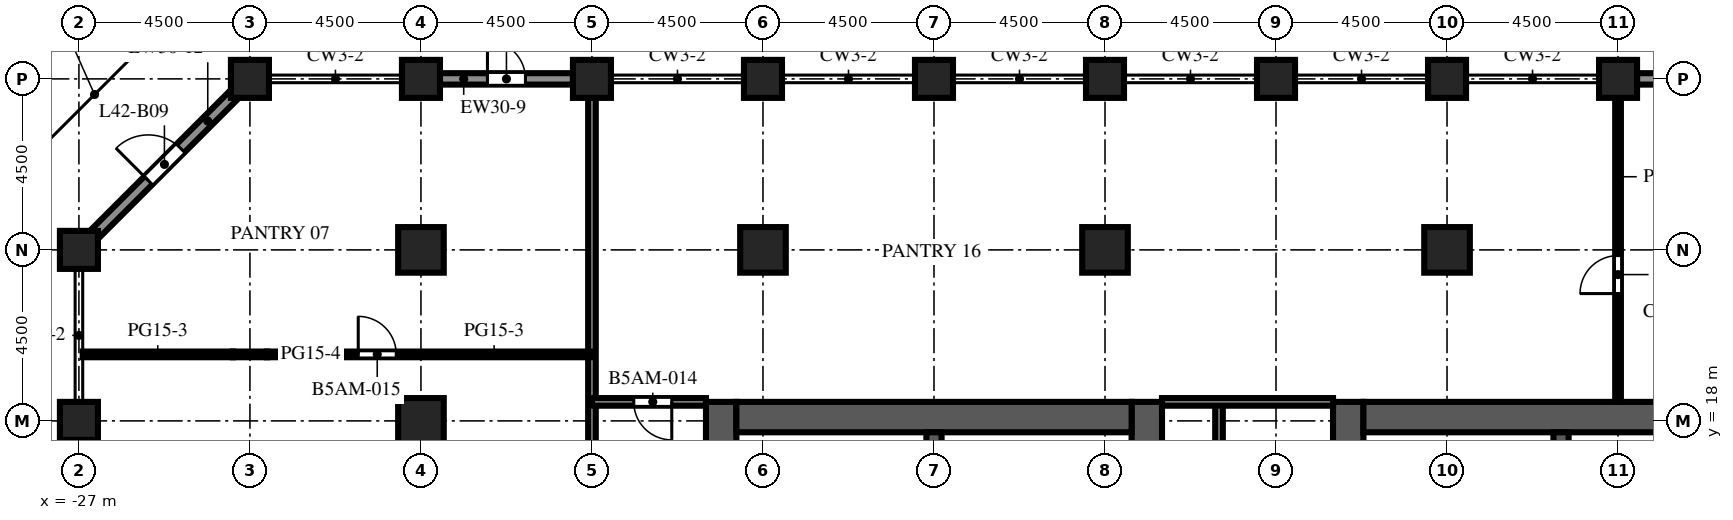
"""IFC4 building model, lengths in metres.
Left out: names, types, materials, properties, quantities, classifications, styles, units other than length and angle.
Written with IfcOpenShell. Run it as: python <this file> out.ifc"""

import sys

from ifc_helpers import new_model, si_unit, direction, frame, frame_2d, origin, origin_2d, place, context, subcontext, project, spatial, rectangle, extrude, element, fill, save


model = new_model("IFC4")
c1 = context("Model", 3, precision=1e-05, world=origin(), true_north=direction((0.0, 1.0)))
c2 = subcontext(c1, "Body", "Model", "MODEL_VIEW")
j1 = project(units=[si_unit("LENGTHUNIT", "METRE"), si_unit("PLANEANGLEUNIT", "RADIAN")], contexts=[c1])
p1 = place(None, origin())
s1 = spatial("IfcSite", under=j1, at=p1, CompositionType="ELEMENT")
p2 = place(p1, origin())
s2 = spatial("IfcBuilding", under=s1, at=p2, CompositionType="ELEMENT")
p3 = place(p2, frame((0.0, 0.0, 185.5)))
s3 = spatial("IfcBuildingStorey", under=s2, at=p3, CompositionType="ELEMENT", Elevation=185.5)
p4 = place(p3, frame((-27.0, 18.0, 0.0), z_axis=(0.0, 0.0, 1.0), x_axis=(1.0, 0.0, 0.0)))
e1 = element("IfcColumn", 1, at=p4, inside=s3, PredefinedType="COLUMN", context=c2, shape_type="SweptSolid", body=[
    extrude(rectangle(XDim=1.0, YDim=1.0, at=origin_2d()), origin(), (0.0, 0.0, 1.0), 3.75),
])
p5 = place(p3, frame((-27.0, 22.5, 0.0), z_axis=(0.0, 0.0, 1.0), x_axis=(1.0, 0.0, 0.0)))
e2 = element("IfcColumn", 2, at=p5, inside=s3, PredefinedType="COLUMN", context=c2, shape_type="SweptSolid", body=[
    extrude(rectangle(XDim=1.0, YDim=1.0, at=origin_2d()), origin(), (0.0, 0.0, 1.0), 6.0),
])
p6 = place(p3, frame((-22.5, 27.0, 0.0), z_axis=(0.0, 0.0, 1.0), x_axis=(1.0, 0.0, 0.0)))
e3 = element("IfcColumn", 3, at=p6, inside=s3, PredefinedType="COLUMN", context=c2, shape_type="SweptSolid", body=[
    extrude(rectangle(XDim=1.0, YDim=1.0, at=origin_2d()), origin(), (0.0, 0.0, 1.0), 3.75),
])
for number, where, z_axis, x_axis in (
    (4, (-18.0, 27.0, 0.0), (0.0, 0.0, 1.0), (1.0, 0.0, 0.0)),
    (5, (-13.5, 27.0, 0.0), (0.0, 0.0, 1.0), (1.0, 0.0, 0.0)),
    (6, (-9.0, 27.0, 0.0), (0.0, 0.0, 1.0), (1.0, 0.0, 0.0)),
    (7, (-4.5, 27.0, 0.0), (0.0, 0.0, 1.0), (1.0, 0.0, 0.0)),
    (8, (0.0, 27.0, 0.0), (0.0, 0.0, 1.0), (1.0, 0.0, 0.0)),
    (9, (4.5, 27.0, 0.0), (0.0, 0.0, 1.0), (1.0, 0.0, 0.0)),
    (10, (9.0, 27.0, 0.0), (0.0, 0.0, 1.0), (1.0, 0.0, 0.0)),
    (11, (13.5, 27.0, 0.0), (0.0, 0.0, 1.0), (1.0, 0.0, 0.0)),
):
    element("IfcColumn", number, at=place(p3, frame(where, z_axis=z_axis, x_axis=x_axis)), inside=s3, PredefinedType="COLUMN", context=c2, shape_type="SweptSolid", body=[
        extrude(rectangle(XDim=1.0, YDim=1.0, at=origin_2d()), origin(), (0.0, 0.0, 1.0), 6.0),
    ])
p7 = place(p3, frame((-18.0, 18.0, 0.0), z_axis=(0.0, 0.0, 1.0), x_axis=(1.0, 0.0, 0.0)))
e12 = element("IfcColumn", 12, at=p7, inside=s3, PredefinedType="COLUMN", context=c2, shape_type="SweptSolid", body=[
    extrude(rectangle(XDim=1.2, YDim=1.2, at=origin_2d()), origin(), (0.0, 0.0, 1.0), 5.55),
])
for number, where, z_axis, x_axis in (
    (13, (-18.0, 22.5, 0.0), (0.0, 0.0, 1.0), (1.0, 0.0, 0.0)),
    (14, (-9.0, 22.5, 0.0), (0.0, 0.0, 1.0), (1.0, 0.0, 0.0)),
    (15, (0.0, 22.5, 0.0), (0.0, 0.0, 1.0), (1.0, 0.0, 0.0)),
    (16, (9.0, 22.5, 0.0), (0.0, 0.0, 1.0), (1.0, 0.0, 0.0)),
):
    element("IfcColumn", number, at=place(p3, frame(where, z_axis=z_axis, x_axis=x_axis)), inside=s3, PredefinedType="COLUMN", context=c2, shape_type="SweptSolid", body=[
        extrude(rectangle(XDim=1.2, YDim=1.2, at=origin_2d()), origin(), (0.0, 0.0, 1.0), 6.0),
    ])
p8 = place(p3, frame((-10.1, -9.0, 0.0), z_axis=(0.0, 0.0, 1.0), x_axis=(0.0, 1.0, 0.0)))
e17 = element("IfcWall", 17, at=p8, inside=s3, PredefinedType="SHEAR", context=c2, shape_type="SweptSolid", body=[
    extrude(rectangle(XDim=27.5, YDim=0.8, at=frame_2d((13.75, 0.0))), origin(), (0.0, 0.0, 1.0), 6.0),
])
p9 = place(p8, frame((12.55, 0.0, 0.0)))
e18 = element("IfcOpeningElement", 18, at=p9, cuts=e17, PredefinedType="OPENING", context=c2, shape_type="SweptSolid", body=[
    extrude(rectangle(XDim=2.4, YDim=2.4, at=frame_2d((1.2, 1.2))), frame((0.0, 0.41, 0.0), z_axis=(0.0, -1.0, 0.0), x_axis=(1.0, 0.0, 0.0)), (0.0, 0.0, 1.0), 0.82),
])
p10 = place(p8, frame((6.825, 0.0, 0.0)))
e19 = element("IfcOpeningElement", 19, at=p10, cuts=e17, PredefinedType="OPENING", context=c2, shape_type="SweptSolid", body=[
    extrude(rectangle(XDim=1.2, YDim=2.1, at=frame_2d((0.6, 1.05))), frame((0.0, 0.41, 0.0), z_axis=(0.0, -1.0, 0.0), x_axis=(1.0, 0.0, 0.0)), (0.0, 0.0, 1.0), 0.82),
])
p11 = place(p8, frame((19.475, 0.0, 0.0)))
e20 = element("IfcOpeningElement", 20, at=p11, cuts=e17, PredefinedType="OPENING", context=c2, shape_type="SweptSolid", body=[
    extrude(rectangle(XDim=1.2, YDim=2.1, at=frame_2d((0.6, 1.05))), frame((0.0, 0.41, 0.0), z_axis=(0.0, -1.0, 0.0), x_axis=(1.0, 0.0, 0.0)), (0.0, 0.0, 1.0), 0.82),
])
p12 = place(p3, frame((1.1, -9.0, 0.0), z_axis=(0.0, 0.0, 1.0), x_axis=(0.0, 1.0, 0.0)))
e21 = element("IfcWall", 21, at=p12, inside=s3, PredefinedType="SHEAR", context=c2, shape_type="SweptSolid", body=[
    extrude(rectangle(XDim=27.5, YDim=0.8, at=frame_2d((13.75, 0.0))), origin(), (0.0, 0.0, 1.0), 6.0),
])
p13 = place(p12, frame((12.55, 0.0, 0.0)))
e22 = element("IfcOpeningElement", 22, at=p13, cuts=e21, PredefinedType="OPENING", context=c2, shape_type="SweptSolid", body=[
    extrude(rectangle(XDim=2.4, YDim=2.4, at=frame_2d((1.2, 1.2))), frame((0.0, 0.41, 0.0), z_axis=(0.0, -1.0, 0.0), x_axis=(1.0, 0.0, 0.0)), (0.0, 0.0, 1.0), 0.82),
])
p14 = place(p12, frame((3.85, 0.0, 0.0)))
e23 = element("IfcOpeningElement", 23, at=p14, cuts=e21, PredefinedType="OPENING", context=c2, shape_type="SweptSolid", body=[
    extrude(rectangle(XDim=0.95, YDim=2.1, at=frame_2d((0.475, 1.05))), frame((0.0, 0.41, 0.0), z_axis=(0.0, -1.0, 0.0), x_axis=(1.0, 0.0, 0.0)), (0.0, 0.0, 1.0), 0.82),
])
p15 = place(p12, frame((23.475, 0.0, 0.0)))
e24 = element("IfcOpeningElement", 24, at=p15, cuts=e21, PredefinedType="OPENING", context=c2, shape_type="SweptSolid", body=[
    extrude(rectangle(XDim=1.2, YDim=2.1, at=frame_2d((0.6, 1.05))), frame((0.0, 0.41, 0.0), z_axis=(0.0, -1.0, 0.0), x_axis=(1.0, 0.0, 0.0)), (0.0, 0.0, 1.0), 0.82),
])
p16 = place(p3, frame((-9.7, 18.1, 0.0), z_axis=(0.0, 0.0, 1.0), x_axis=(1.0, 0.0, 0.0)))
e25 = element("IfcWall", 25, at=p16, inside=s3, PredefinedType="SHEAR", context=c2, shape_type="SweptSolid", body=[
    extrude(rectangle(XDim=10.4, YDim=0.8, at=frame_2d((5.2, 0.0))), origin(), (0.0, 0.0, 1.0), 6.0),
])
p17 = place(p3, frame((-4.5, 10.2, 0.0), z_axis=(0.0, 0.0, 1.0), x_axis=(0.0, 1.0, 0.0)))
e26 = element("IfcWall", 26, at=p17, inside=s3, PredefinedType="SHEAR", context=c2, shape_type="SweptSolid", body=[
    extrude(rectangle(XDim=7.5, YDim=0.4, at=frame_2d((3.75, 0.0))), origin(), (0.0, 0.0, 1.0), 6.0),
])
p18 = place(p3, frame((6.4, -9.0, 0.0), z_axis=(0.0, 0.0, 1.0), x_axis=(0.0, 1.0, 0.0)))
e27 = element("IfcWall", 27, at=p18, inside=s3, PredefinedType="SHEAR", context=c2, shape_type="SweptSolid", body=[
    extrude(rectangle(XDim=27.5, YDim=0.8, at=frame_2d((13.75, 0.0))), origin(), (0.0, 0.0, 1.0), 6.0),
])
p19 = place(p18, frame((12.55, 0.0, 0.0)))
e28 = element("IfcOpeningElement", 28, at=p19, cuts=e27, PredefinedType="OPENING", context=c2, shape_type="SweptSolid", body=[
    extrude(rectangle(XDim=2.4, YDim=2.4, at=frame_2d((1.2, 1.2))), frame((0.0, 0.41, 0.0), z_axis=(0.0, -1.0, 0.0), x_axis=(1.0, 0.0, 0.0)), (0.0, 0.0, 1.0), 0.82),
])
p20 = place(p18, frame((3.85, 0.0, 0.0)))
e29 = element("IfcOpeningElement", 29, at=p20, cuts=e27, PredefinedType="OPENING", context=c2, shape_type="SweptSolid", body=[
    extrude(rectangle(XDim=0.95, YDim=2.1, at=frame_2d((0.475, 1.05))), frame((0.0, 0.41, 0.0), z_axis=(0.0, -1.0, 0.0), x_axis=(1.0, 0.0, 0.0)), (0.0, 0.0, 1.0), 0.82),
])
p21 = place(p18, frame((23.475, 0.0, 0.0)))
e30 = element("IfcOpeningElement", 30, at=p21, cuts=e27, PredefinedType="OPENING", context=c2, shape_type="SweptSolid", body=[
    extrude(rectangle(XDim=1.2, YDim=2.1, at=frame_2d((0.6, 1.05))), frame((0.0, 0.41, 0.0), z_axis=(0.0, -1.0, 0.0), x_axis=(1.0, 0.0, 0.0)), (0.0, 0.0, 1.0), 0.82),
])
p22 = place(p3, frame((6.8, 18.1, 0.0), z_axis=(0.0, 0.0, 1.0), x_axis=(1.0, 0.0, 0.0)))
e31 = element("IfcWall", 31, at=p22, inside=s3, PredefinedType="SHEAR", context=c2, shape_type="SweptSolid", body=[
    extrude(rectangle(XDim=10.4, YDim=0.8, at=frame_2d((5.2, 0.0))), origin(), (0.0, 0.0, 1.0), 6.0),
])
p23 = place(p3, frame((12.0, 10.2, 0.0), z_axis=(0.0, 0.0, 1.0), x_axis=(0.0, 1.0, 0.0)))
e32 = element("IfcWall", 32, at=p23, inside=s3, PredefinedType="SHEAR", context=c2, shape_type="SweptSolid", body=[
    extrude(rectangle(XDim=7.5, YDim=0.4, at=frame_2d((3.75, 0.0))), origin(), (0.0, 0.0, 1.0), 6.0),
])
p24 = place(p3, frame((14.0, 27.0, 0.0), z_axis=(0.0, 0.0, 1.0), x_axis=(1.0, 0.0, 0.0)))
e33 = element("IfcWall", 33, at=p24, inside=s3, PredefinedType="SOLIDWALL", context=c2, shape_type="SweptSolid", body=[
    extrude(rectangle(XDim=3.5, YDim=0.3, at=frame_2d((1.75, 0.0))), origin(), (0.0, 0.0, 1.0), 4.75),
])
p25 = place(p24, frame((1.25, 0.0, 0.0)))
e34 = element("IfcOpeningElement", 34, at=p25, cuts=e33, PredefinedType="OPENING", context=c2, shape_type="SweptSolid", body=[
    extrude(rectangle(XDim=1.0, YDim=2.2, at=frame_2d((0.5, 1.1))), frame((0.0, 0.16, 0.0), z_axis=(0.0, -1.0, 0.0), x_axis=(1.0, 0.0, 0.0)), (0.0, 0.0, 1.0), 0.32),
])
p26 = place(p3, frame((-17.5, 27.0, 0.0), z_axis=(0.0, 0.0, 1.0), x_axis=(1.0, 0.0, 0.0)))
e35 = element("IfcWall", 35, at=p26, inside=s3, PredefinedType="SOLIDWALL", context=c2, shape_type="SweptSolid", body=[
    extrude(rectangle(XDim=3.5, YDim=0.3, at=frame_2d((1.75, 0.0))), origin(), (0.0, 0.0, 1.0), 4.75),
])
p27 = place(p26, frame((1.25, 0.0, 0.0)))
e36 = element("IfcOpeningElement", 36, at=p27, cuts=e35, PredefinedType="OPENING", context=c2, shape_type="SweptSolid", body=[
    extrude(rectangle(XDim=1.0, YDim=2.2, at=frame_2d((0.5, 1.1))), frame((0.0, 0.16, 0.0), z_axis=(0.0, -1.0, 0.0), x_axis=(1.0, 0.0, 0.0)), (0.0, 0.0, 1.0), 0.32),
])
p28 = place(p3, frame((-26.606, 22.894, 0.0), z_axis=(0.0, 0.0, 1.0), x_axis=(0.707106781187, 0.707106781187, 0.0)))
e37 = element("IfcWall", 37, at=p28, inside=s3, PredefinedType="SOLIDWALL", context=c2, shape_type="SweptSolid", body=[
    extrude(rectangle(XDim=5.25, YDim=0.3, at=frame_2d((2.625, 0.0))), origin(), (0.0, 0.0, 1.0), 3.75),
])
p29 = place(p28, frame((2.025, 0.0, 0.0)))
e38 = element("IfcOpeningElement", 38, at=p29, cuts=e37, PredefinedType="OPENING", context=c2, shape_type="SweptSolid", body=[
    extrude(rectangle(XDim=1.2, YDim=2.2, at=frame_2d((0.6, 1.1))), frame((0.0, 0.16, 0.0), z_axis=(0.0, -1.0, 0.0), x_axis=(1.0, 0.0, 0.0)), (0.0, 0.0, 1.0), 0.32),
])
p30 = place(p3, frame((-0.6, 15.075, 0.0), z_axis=(0.0, 0.0, 1.0), x_axis=(0.0, 1.0, 0.0)))
e39 = element("IfcWall", 39, at=p30, inside=s3, PredefinedType="PARTITIONING", context=c2, shape_type="SweptSolid", body=[
    extrude(rectangle(XDim=2.625, YDim=0.1, at=frame_2d((1.312, 0.0))), origin(), (0.0, 0.0, 1.0), 5.55),
])
p31 = place(p30, frame((0.812, 0.0, 0.0)))
e40 = element("IfcOpeningElement", 40, at=p31, cuts=e39, PredefinedType="OPENING", context=c2, shape_type="SweptSolid", body=[
    extrude(rectangle(XDim=1.0, YDim=2.1, at=frame_2d((0.5, 1.05))), frame((0.0, 0.06, 0.0), z_axis=(0.0, -1.0, 0.0), x_axis=(1.0, 0.0, 0.0)), (0.0, 0.0, 1.0), 0.12),
])
p32 = place(p3, frame((8.1, 15.075, 0.0), z_axis=(0.0, 0.0, 1.0), x_axis=(0.0, 1.0, 0.0)))
e41 = element("IfcWall", 41, at=p32, inside=s3, PredefinedType="PARTITIONING", context=c2, shape_type="SweptSolid", body=[
    extrude(rectangle(XDim=2.625, YDim=0.1, at=frame_2d((1.312, 0.0))), origin(), (0.0, 0.0, 1.0), 5.55),
])
p33 = place(p32, frame((0.812, 0.0, 0.0)))
e42 = element("IfcOpeningElement", 42, at=p33, cuts=e41, PredefinedType="OPENING", context=c2, shape_type="SweptSolid", body=[
    extrude(rectangle(XDim=1.0, YDim=2.1, at=frame_2d((0.5, 1.05))), frame((0.0, 0.06, 0.0), z_axis=(0.0, -1.0, 0.0), x_axis=(1.0, 0.0, 0.0)), (0.0, 0.0, 1.0), 0.12),
])
p34 = place(p3, frame((-13.5, 6.25, 0.0), z_axis=(0.0, 0.0, 1.0), x_axis=(0.0, 1.0, 0.0)))
e43 = element("IfcWall", 43, at=p34, inside=s3, PredefinedType="PARTITIONING", context=c2, shape_type="SweptSolid", body=[
    extrude(rectangle(XDim=20.25, YDim=0.2, at=frame_2d((10.125, 0.0))), origin(), (0.0, 0.0, 1.0), 5.55),
])
p35 = place(p3, frame((3.0, 6.7, 0.0), z_axis=(0.0, 0.0, 1.0), x_axis=(0.0, 1.0, 0.0)))
e44 = element("IfcWall", 44, at=p35, inside=s3, PredefinedType="PARTITIONING", context=c2, shape_type="SweptSolid", body=[
    extrude(rectangle(XDim=11.8, YDim=0.2, at=frame_2d((5.9, 0.0))), origin(), (0.0, 0.0, 1.0), 5.55),
])
p36 = place(p35, frame((3.85, 0.0, 0.0)))
e45 = element("IfcOpeningElement", 45, at=p36, cuts=e44, PredefinedType="OPENING", context=c2, shape_type="SweptSolid", body=[
    extrude(rectangle(XDim=1.0, YDim=2.1, at=frame_2d((0.5, 1.05))), frame((0.0, 0.11, 0.0), z_axis=(0.0, -1.0, 0.0), x_axis=(1.0, 0.0, 0.0)), (0.0, 0.0, 1.0), 0.22),
])
p37 = place(p3, frame((13.5, 26.5, 0.0), z_axis=(0.0, 0.0, 1.0), x_axis=(0.0, -1.0, 0.0)))
e46 = element("IfcWall", 46, at=p37, inside=s3, PredefinedType="PARTITIONING", context=c2, shape_type="SweptSolid", body=[
    extrude(rectangle(XDim=8.0, YDim=0.15, at=frame_2d((4.0, 0.0))), origin(), (0.0, 0.0, 1.0), 5.55),
])
p38 = place(p37, frame((4.15, 0.0, 0.0)))
e47 = element("IfcOpeningElement", 47, at=p38, cuts=e46, PredefinedType="OPENING", context=c2, shape_type="SweptSolid", body=[
    extrude(rectangle(XDim=1.0, YDim=2.1, at=frame_2d((0.5, 1.05))), frame((0.0, 0.085, 0.0), z_axis=(0.0, -1.0, 0.0), x_axis=(1.0, 0.0, 0.0)), (0.0, 0.0, 1.0), 0.17),
])
p39 = place(p3, frame((-13.5, 18.5, 0.0), z_axis=(0.0, 0.0, 1.0), x_axis=(1.0, 0.0, 0.0)))
e48 = element("IfcWall", 48, at=p39, inside=s3, PredefinedType="PARTITIONING", context=c2, shape_type="SweptSolid", body=[
    extrude(rectangle(XDim=3.0, YDim=0.2, at=frame_2d((1.5, 0.0))), origin(), (0.0, 0.0, 1.0), 5.55),
])
p40 = place(p39, frame((1.1, 0.0, 0.0)))
e49 = element("IfcOpeningElement", 49, at=p40, cuts=e48, PredefinedType="OPENING", context=c2, shape_type="SweptSolid", body=[
    extrude(rectangle(XDim=1.0, YDim=2.1, at=frame_2d((0.5, 1.05))), frame((0.0, 0.11, 0.0), z_axis=(0.0, -1.0, 0.0), x_axis=(1.0, 0.0, 0.0)), (0.0, 0.0, 1.0), 0.22),
])
p41 = place(p3, frame((1.5, 18.5, 0.0), z_axis=(0.0, 0.0, 1.0), x_axis=(1.0, 0.0, 0.0)))
e50 = element("IfcWall", 50, at=p41, inside=s3, PredefinedType="PARTITIONING", context=c2, shape_type="SweptSolid", body=[
    extrude(rectangle(XDim=4.5, YDim=0.2, at=frame_2d((2.25, 0.0))), origin(), (0.0, 0.0, 1.0), 5.55),
])
p42 = place(p3, frame((-26.9, 19.75, 0.0), z_axis=(0.0, 0.0, 1.0), x_axis=(1.0, 0.0, 0.0)))
e51 = element("IfcWall", 51, at=p42, inside=s3, PredefinedType="PARTITIONING", context=c2, shape_type="SweptSolid", body=[
    extrude(rectangle(XDim=3.95, YDim=0.15, at=frame_2d((1.975, 0.0))), origin(), (0.0, 0.0, 1.0), 5.55),
])
p43 = place(p3, frame((-22.95, 19.75, 0.0), z_axis=(0.0, 0.0, 1.0), x_axis=(1.0, 0.0, 0.0)))
e52 = element("IfcWall", 52, at=p43, inside=s3, PredefinedType="PARTITIONING", context=c2, shape_type="SweptSolid", body=[
    extrude(rectangle(XDim=0.9, YDim=0.15, at=frame_2d((0.45, 0.0))), origin(), (0.0, 0.0, 1.0), 3.72),
])
p44 = place(p3, frame((-22.05, 19.75, 0.0), z_axis=(0.0, 0.0, 1.0), x_axis=(1.0, 0.0, 0.0)))
e53 = element("IfcWall", 53, at=p44, inside=s3, PredefinedType="PARTITIONING", context=c2, shape_type="SweptSolid", body=[
    extrude(rectangle(XDim=8.55, YDim=0.15, at=frame_2d((4.275, 0.0))), origin(), (0.0, 0.0, 1.0), 5.55),
])
p45 = place(p44, frame((2.4, 0.0, 0.0)))
e54 = element("IfcOpeningElement", 54, at=p45, cuts=e53, PredefinedType="OPENING", context=c2, shape_type="SweptSolid", body=[
    extrude(rectangle(XDim=1.0, YDim=2.1, at=frame_2d((0.5, 1.05))), frame((0.0, 0.085, 0.0), z_axis=(0.0, -1.0, 0.0), x_axis=(1.0, 0.0, 0.0)), (0.0, 0.0, 1.0), 0.17),
])
p46 = place(p27, origin())
e55 = element("IfcDoor", 55, at=p46, inside=s3, OperationType="SINGLE_SWING_LEFT", PredefinedType="DOOR", context=c2, shape_type="SweptSolid", body=[
    extrude(rectangle(XDim=1.0, YDim=2.2, at=frame_2d((0.5, 1.1))), frame((0.0, 0.025, 0.0), z_axis=(0.0, -1.0, 0.0), x_axis=(1.0, 0.0, 0.0)), (0.0, 0.0, 1.0), 0.05),
])
fill(e36, e55)
p47 = place(p29, origin())
e56 = element("IfcDoor", 56, at=p47, inside=s3, OperationType="SINGLE_SWING_LEFT", PredefinedType="DOOR", context=c2, shape_type="SweptSolid", body=[
    extrude(rectangle(XDim=1.2, YDim=2.2, at=frame_2d((0.6, 1.1))), frame((0.0, 0.025, 0.0), z_axis=(0.0, -1.0, 0.0), x_axis=(1.0, 0.0, 0.0)), (0.0, 0.0, 1.0), 0.05),
])
fill(e38, e56)
p48 = place(p38, origin())
e57 = element("IfcDoor", 57, at=p48, inside=s3, OperationType="SINGLE_SWING_RIGHT", PredefinedType="DOOR", context=c2, shape_type="SweptSolid", body=[
    extrude(rectangle(XDim=1.0, YDim=2.1, at=frame_2d((0.5, 1.05))), frame((0.0, 0.025, 0.0), z_axis=(0.0, -1.0, 0.0), x_axis=(1.0, 0.0, 0.0)), (0.0, 0.0, 1.0), 0.05),
])
fill(e47, e57)
p49 = place(p40, origin())
e58 = element("IfcDoor", 58, at=p49, inside=s3, OperationType="SINGLE_SWING_RIGHT", PredefinedType="DOOR", context=c2, shape_type="SweptSolid", body=[
    extrude(rectangle(XDim=1.0, YDim=2.1, at=frame_2d((0.5, 1.05))), frame((0.0, 0.025, 0.0), z_axis=(0.0, -1.0, 0.0), x_axis=(1.0, 0.0, 0.0)), (0.0, 0.0, 1.0), 0.05),
])
fill(e49, e58)
p50 = place(p45, origin())
e59 = element("IfcDoor", 59, at=p50, inside=s3, OperationType="SINGLE_SWING_LEFT", PredefinedType="DOOR", context=c2, shape_type="SweptSolid", body=[
    extrude(rectangle(XDim=1.0, YDim=2.1, at=frame_2d((0.5, 1.05))), frame((0.0, 0.025, 0.0), z_axis=(0.0, -1.0, 0.0), x_axis=(1.0, 0.0, 0.0)), (0.0, 0.0, 1.0), 0.05),
])
fill(e54, e59)
save(model, sys.argv[1])
